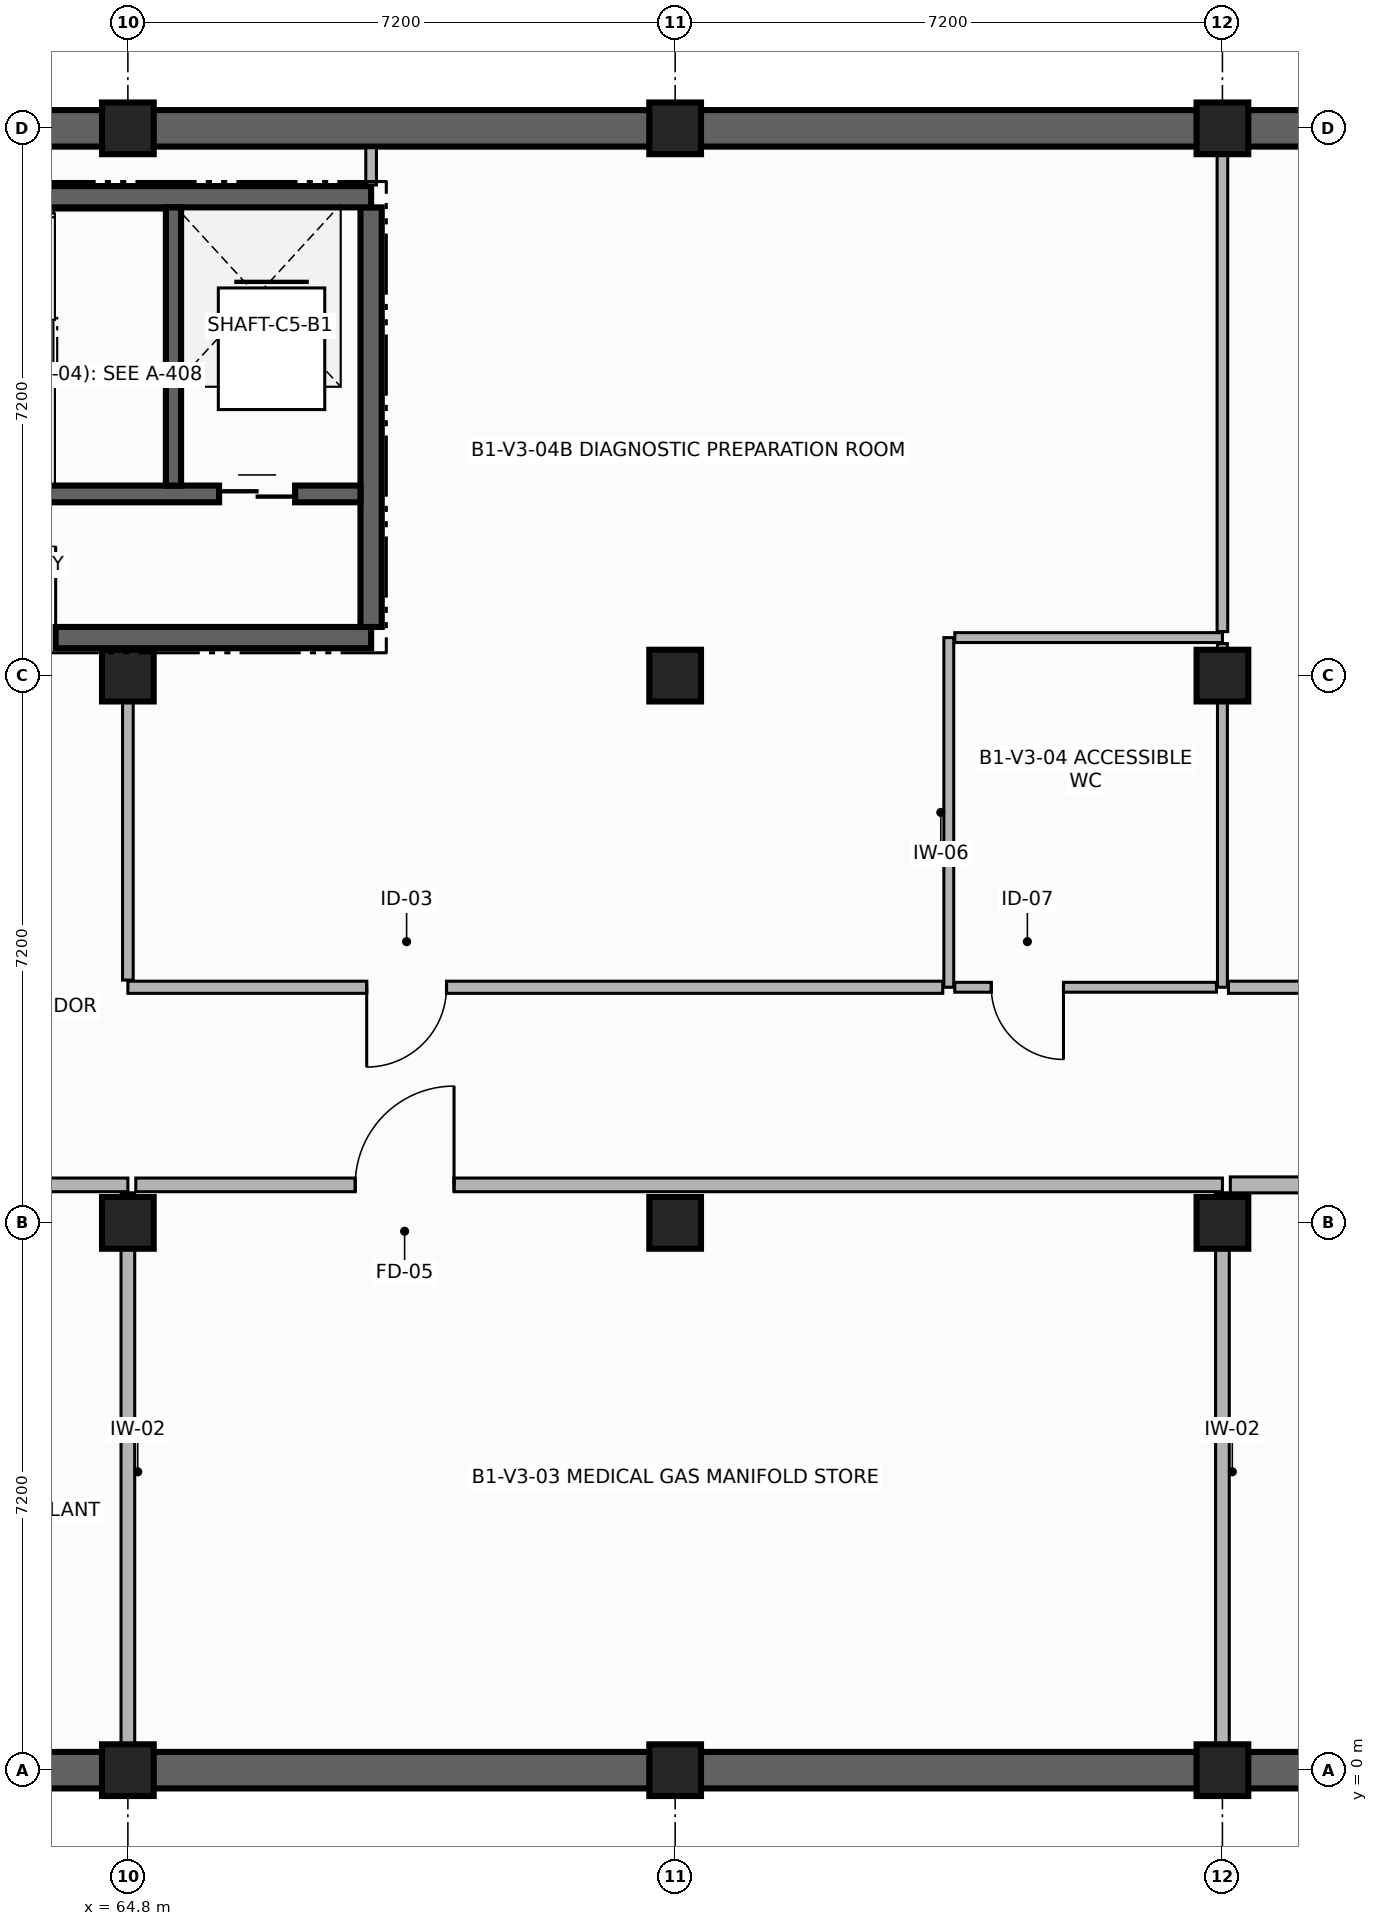
"""IFC4 building model, lengths in metres.
Left out: names, types, materials, properties, quantities, classifications, styles, units other than length and angle.
Written with IfcOpenShell. Run it as: python <this file> out.ifc"""

import sys

from ifc_helpers import new_model, si_unit, direction, frame, frame_2d, origin, origin_2d, place, context, subcontext, project, spatial, rectangle, extrude, element, fill, save


model = new_model("IFC4")
c1 = context("Model", 3, precision=1e-05, world=origin(), true_north=direction((0.0, 1.0)))
c2 = subcontext(c1, "Body", "Model", "MODEL_VIEW")
j1 = project(units=[si_unit("LENGTHUNIT", "METRE"), si_unit("PLANEANGLEUNIT", "RADIAN")], contexts=[c1])
p1 = place(None, origin())
s1 = spatial("IfcSite", under=j1, at=p1, CompositionType="ELEMENT")
p2 = place(p1, origin())
s2 = spatial("IfcBuilding", under=s1, at=p2, CompositionType="ELEMENT")
p3 = place(p2, frame((0.0, 0.0, -4.2)))
s3 = spatial("IfcBuildingStorey", under=s2, at=p3, CompositionType="ELEMENT", Elevation=-4.2)
for number, where, z_axis, x_axis in (
    (1, (64.8, 0.0, -0.4), (0.0, 0.0, 1.0), (1.0, 0.0, 0.0)),
    (2, (64.8, 7.2, -0.4), (0.0, 0.0, 1.0), (1.0, 0.0, 0.0)),
    (3, (64.8, 14.4, -0.4), (0.0, 0.0, 1.0), (1.0, 0.0, 0.0)),
    (4, (64.8, 21.6, -0.4), (0.0, 0.0, 1.0), (1.0, 0.0, 0.0)),
    (5, (72.0, 0.0, -0.4), (0.0, 0.0, 1.0), (1.0, 0.0, 0.0)),
    (6, (72.0, 7.2, -0.4), (0.0, 0.0, 1.0), (1.0, 0.0, 0.0)),
    (7, (72.0, 14.4, -0.4), (0.0, 0.0, 1.0), (1.0, 0.0, 0.0)),
    (8, (72.0, 21.6, -0.4), (0.0, 0.0, 1.0), (1.0, 0.0, 0.0)),
    (9, (79.2, 0.0, -0.4), (0.0, 0.0, 1.0), (1.0, 0.0, 0.0)),
    (10, (79.2, 7.2, -0.4), (0.0, 0.0, 1.0), (1.0, 0.0, 0.0)),
    (11, (79.2, 14.4, -0.4), (0.0, 0.0, 1.0), (1.0, 0.0, 0.0)),
    (12, (79.2, 21.6, -0.4), (0.0, 0.0, 1.0), (1.0, 0.0, 0.0)),
):
    element("IfcColumn", number, at=place(p3, frame(where, z_axis=z_axis, x_axis=x_axis)), inside=s3, PredefinedType="COLUMN", context=c2, shape_type="SweptSolid", body=[
        extrude(rectangle(XDim=0.68, YDim=0.68, at=origin_2d()), origin(), (0.0, 0.0, 1.0), 4.25),
    ])
for number, where, z_axis, x_axis in (
    (13, (57.6, 0.0, 0.0), (0.0, 0.0, 1.0), (1.0, 0.0, 0.0)),
    (14, (64.8, 0.0, 0.0), (0.0, 0.0, 1.0), (1.0, 0.0, 0.0)),
    (15, (72.0, 0.0, 0.0), (0.0, 0.0, 1.0), (1.0, 0.0, 0.0)),
    (16, (79.2, 0.0, 0.0), (0.0, 0.0, 1.0), (1.0, 0.0, 0.0)),
    (17, (86.4, 21.6, 0.0), (0.0, 0.0, 1.0), (-1.0, 0.0, 0.0)),
    (18, (79.2, 21.6, 0.0), (0.0, 0.0, 1.0), (-1.0, 0.0, 0.0)),
    (19, (72.0, 21.6, 0.0), (0.0, 0.0, 1.0), (-1.0, 0.0, 0.0)),
    (20, (64.8, 21.6, 0.0), (0.0, 0.0, 1.0), (-1.0, 0.0, 0.0)),
):
    element("IfcWall", number, at=place(p3, frame(where, z_axis=z_axis, x_axis=x_axis)), inside=s3, PredefinedType="ELEMENTEDWALL", context=c2, shape_type="SweptSolid", body=[
        extrude(rectangle(XDim=7.2, YDim=0.48, at=frame_2d((3.6, 0.0))), origin(), (0.0, 0.0, 1.0), 3.25),
    ])
p4 = place(p3, frame((58.5, 14.9, 0.0), z_axis=(0.0, 0.0, 1.0), x_axis=(1.0, 0.0, 0.0)))
e21 = element("IfcWall", 21, at=p4, inside=s3, PredefinedType="SHEAR", context=c2, shape_type="SweptSolid", body=[
    extrude(rectangle(XDim=9.5, YDim=0.28, at=frame_2d((4.75, 0.0))), origin(), (0.0, 0.0, 1.0), 3.9),
])
p5 = place(p4, frame((4.15, 0.0, 0.0)))
e22 = element("IfcOpeningElement", 22, at=p5, cuts=e21, PredefinedType="OPENING", context=c2, shape_type="SweptSolid", body=[
    extrude(rectangle(XDim=1.2, YDim=2.25, at=frame_2d((0.6, 1.125))), frame((0.0, 0.15, 0.0), z_axis=(0.0, -1.0, 0.0), x_axis=(1.0, 0.0, 0.0)), (0.0, 0.0, 1.0), 0.3),
])
p6 = place(p3, frame((68.0, 15.04, 0.0), z_axis=(0.0, 0.0, 1.0), x_axis=(0.0, 1.0, 0.0)))
e23 = element("IfcWall", 23, at=p6, inside=s3, PredefinedType="SHEAR", context=c2, shape_type="SweptSolid", body=[
    extrude(rectangle(XDim=5.52, YDim=0.28, at=frame_2d((2.76, 0.0))), origin(), (0.0, 0.0, 1.0), 3.9),
])
p7 = place(p3, frame((68.0, 20.7, 0.0), z_axis=(0.0, 0.0, 1.0), x_axis=(-1.0, 0.0, 0.0)))
e24 = element("IfcWall", 24, at=p7, inside=s3, PredefinedType="SHEAR", context=c2, shape_type="SweptSolid", body=[
    extrude(rectangle(XDim=9.5, YDim=0.28, at=frame_2d((4.75, 0.0))), origin(), (0.0, 0.0, 1.0), 3.9),
])
p8 = place(p3, frame((58.64, 16.79, 0.0), z_axis=(0.0, 0.0, 1.0), x_axis=(1.0, 0.0, 0.0)))
e25 = element("IfcWall", 25, at=p8, inside=s3, PredefinedType="SHEAR", context=c2, shape_type="SweptSolid", body=[
    extrude(rectangle(XDim=9.22, YDim=0.22, at=frame_2d((4.61, 0.0))), origin(), (0.0, 0.0, 1.0), 3.9),
])
p9 = place(p8, frame((0.31, 0.0, 0.0)))
e26 = element("IfcOpeningElement", 26, at=p9, cuts=e25, PredefinedType="OPENING", context=c2, shape_type="SweptSolid", body=[
    extrude(rectangle(XDim=1.1, YDim=2.15, at=frame_2d((0.55, 1.075))), frame((0.0, 0.12, 0.0), z_axis=(0.0, -1.0, 0.0), x_axis=(1.0, 0.0, 0.0)), (0.0, 0.0, 1.0), 0.24),
])
p10 = place(p8, frame((7.36, 0.0, 0.0)))
e27 = element("IfcOpeningElement", 27, at=p10, cuts=e25, PredefinedType="OPENING", context=c2, shape_type="SweptSolid", body=[
    extrude(rectangle(XDim=1.0, YDim=2.2, at=frame_2d((0.5, 1.1))), frame((0.0, 0.12, 0.0), z_axis=(0.0, -1.0, 0.0), x_axis=(1.0, 0.0, 0.0)), (0.0, 0.0, 1.0), 0.24),
])
p11 = place(p3, frame((65.4, 16.9, 0.0), z_axis=(0.0, 0.0, 1.0), x_axis=(0.0, 1.0, 0.0)))
e28 = element("IfcWall", 28, at=p11, inside=s3, PredefinedType="SHEAR", context=c2, shape_type="SweptSolid", body=[
    extrude(rectangle(XDim=3.66, YDim=0.2, at=frame_2d((1.83, 0.0))), origin(), (0.0, 0.0, 1.0), 3.9),
])
p12 = place(p3, frame((57.855, 7.7, 0.0), z_axis=(0.0, 0.0, 1.0), x_axis=(1.0, 0.0, 0.0)))
e29 = element("IfcWall", 29, at=p12, inside=s3, PredefinedType="PARTITIONING", context=c2, shape_type="SweptSolid", body=[
    extrude(rectangle(XDim=6.945, YDim=0.18, at=frame_2d((3.473, 0.0))), origin(), (0.0, 0.0, 1.0), 3.26),
])
p13 = place(p12, frame((2.588, 0.0, 0.0)))
e30 = element("IfcOpeningElement", 30, at=p13, cuts=e29, PredefinedType="OPENING", context=c2, shape_type="SweptSolid", body=[
    extrude(rectangle(XDim=1.3, YDim=2.2, at=frame_2d((0.65, 1.1))), frame((0.0, 0.1, 0.0), z_axis=(0.0, -1.0, 0.0), x_axis=(1.0, 0.0, 0.0)), (0.0, 0.0, 1.0), 0.2),
])
p14 = place(p3, frame((64.8, 7.596, 0.0), z_axis=(0.0, 0.0, 1.0), x_axis=(0.0, -1.0, 0.0)))
e31 = element("IfcWall", 31, at=p14, inside=s3, PredefinedType="PARTITIONING", context=c2, shape_type="SweptSolid", body=[
    extrude(rectangle(XDim=7.341, YDim=0.18, at=frame_2d((3.67, 0.0))), origin(), (0.0, 0.0, 1.0), 3.26),
])
p15 = place(p3, frame((64.904, 7.7, 0.0), z_axis=(0.0, 0.0, 1.0), x_axis=(1.0, 0.0, 0.0)))
e32 = element("IfcWall", 32, at=p15, inside=s3, PredefinedType="PARTITIONING", context=c2, shape_type="SweptSolid", body=[
    extrude(rectangle(XDim=14.296, YDim=0.18, at=frame_2d((7.148, 0.0))), origin(), (0.0, 0.0, 1.0), 3.26),
])
p16 = place(p15, frame((2.887, 0.0, 0.0)))
e33 = element("IfcOpeningElement", 33, at=p16, cuts=e32, PredefinedType="OPENING", context=c2, shape_type="SweptSolid", body=[
    extrude(rectangle(XDim=1.3, YDim=2.2, at=frame_2d((0.65, 1.1))), frame((0.0, 0.1, 0.0), z_axis=(0.0, -1.0, 0.0), x_axis=(1.0, 0.0, 0.0)), (0.0, 0.0, 1.0), 0.2),
])
p17 = place(p3, frame((79.2, 7.596, 0.0), z_axis=(0.0, 0.0, 1.0), x_axis=(0.0, -1.0, 0.0)))
e34 = element("IfcWall", 34, at=p17, inside=s3, PredefinedType="PARTITIONING", context=c2, shape_type="SweptSolid", body=[
    extrude(rectangle(XDim=7.341, YDim=0.18, at=frame_2d((3.67, 0.0))), origin(), (0.0, 0.0, 1.0), 3.26),
])
p18 = place(p3, frame((75.6, 10.3, 0.0), z_axis=(0.0, 0.0, 1.0), x_axis=(0.0, 1.0, 0.0)))
e35 = element("IfcWall", 35, at=p18, inside=s3, PredefinedType="PARTITIONING", context=c2, shape_type="SweptSolid", body=[
    extrude(rectangle(XDim=4.6, YDim=0.13, at=frame_2d((2.3, 0.0))), origin(), (0.0, 0.0, 1.0), 3.26),
])
p19 = place(p3, frame((75.679, 14.9, 0.0), z_axis=(0.0, 0.0, 1.0), x_axis=(1.0, 0.0, 0.0)))
e36 = element("IfcWall", 36, at=p19, inside=s3, PredefinedType="PARTITIONING", context=c2, shape_type="SweptSolid", body=[
    extrude(rectangle(XDim=3.521, YDim=0.13, at=frame_2d((1.76, 0.0))), origin(), (0.0, 0.0, 1.0), 3.26),
])
p20 = place(p3, frame((79.2, 14.821, 0.0), z_axis=(0.0, 0.0, 1.0), x_axis=(0.0, -1.0, 0.0)))
e37 = element("IfcWall", 37, at=p20, inside=s3, PredefinedType="PARTITIONING", context=c2, shape_type="SweptSolid", body=[
    extrude(rectangle(XDim=4.521, YDim=0.13, at=frame_2d((2.26, 0.0))), origin(), (0.0, 0.0, 1.0), 3.26),
])
p21 = place(p3, frame((79.121, 10.3, 0.0), z_axis=(0.0, 0.0, 1.0), x_axis=(-1.0, 0.0, 0.0)))
e38 = element("IfcWall", 38, at=p21, inside=s3, PredefinedType="PARTITIONING", context=c2, shape_type="SweptSolid", body=[
    extrude(rectangle(XDim=3.442, YDim=0.13, at=frame_2d((1.721, 0.0))), origin(), (0.0, 0.0, 1.0), 3.26),
])
p22 = place(p21, frame((2.012, 0.0, 0.0)))
e39 = element("IfcOpeningElement", 39, at=p22, cuts=e38, PredefinedType="OPENING", context=c2, shape_type="SweptSolid", body=[
    extrude(rectangle(XDim=0.95, YDim=2.1, at=frame_2d((0.475, 1.05))), frame((0.0, 0.075, 0.0), z_axis=(0.0, -1.0, 0.0), x_axis=(1.0, 0.0, 0.0)), (0.0, 0.0, 1.0), 0.15),
])
p23 = place(p3, frame((75.521, 10.3, 0.0), z_axis=(0.0, 0.0, 1.0), x_axis=(-1.0, 0.0, 0.0)))
e40 = element("IfcWall", 40, at=p23, inside=s3, PredefinedType="PARTITIONING", context=c2, shape_type="SweptSolid", body=[
    extrude(rectangle(XDim=10.721, YDim=0.16, at=frame_2d((5.36, 0.0))), origin(), (0.0, 0.0, 1.0), 3.26),
])
p24 = place(p23, frame((6.529, 0.0, 0.0)))
e41 = element("IfcOpeningElement", 41, at=p24, cuts=e40, PredefinedType="OPENING", context=c2, shape_type="SweptSolid", body=[
    extrude(rectangle(XDim=1.05, YDim=2.15, at=frame_2d((0.525, 1.075))), frame((0.0, 0.09, 0.0), z_axis=(0.0, -1.0, 0.0), x_axis=(1.0, 0.0, 0.0)), (0.0, 0.0, 1.0), 0.18),
])
p25 = place(p3, frame((64.8, 10.394, 0.0), z_axis=(0.0, 0.0, 1.0), x_axis=(0.0, 1.0, 0.0)))
e42 = element("IfcWall", 42, at=p25, inside=s3, PredefinedType="PARTITIONING", context=c2, shape_type="SweptSolid", body=[
    extrude(rectangle(XDim=4.351, YDim=0.14, at=frame_2d((2.176, 0.0))), origin(), (0.0, 0.0, 1.0), 3.26),
])
p26 = place(p3, frame((68.0, 20.855, 0.0), z_axis=(0.0, 0.0, 1.0), x_axis=(0.0, 1.0, 0.0)))
e43 = element("IfcWall", 43, at=p26, inside=s3, PredefinedType="PARTITIONING", context=c2, shape_type="SweptSolid", body=[
    extrude(rectangle(XDim=0.49, YDim=0.14, at=frame_2d((0.245, 0.0))), origin(), (0.0, 0.0, 1.0), 3.26),
])
p27 = place(p3, frame((79.2, 21.345, 0.0), z_axis=(0.0, 0.0, 1.0), x_axis=(0.0, -1.0, 0.0)))
e44 = element("IfcWall", 44, at=p27, inside=s3, PredefinedType="PARTITIONING", context=c2, shape_type="SweptSolid", body=[
    extrude(rectangle(XDim=6.366, YDim=0.14, at=frame_2d((3.183, 0.0))), origin(), (0.0, 0.0, 1.0), 3.26),
])
p28 = place(p3, frame((79.304, 7.7, 0.0), z_axis=(0.0, 0.0, 1.0), x_axis=(1.0, 0.0, 0.0)))
e45 = element("IfcWall", 45, at=p28, inside=s3, PredefinedType="PARTITIONING", context=c2, shape_type="SweptSolid", body=[
    extrude(rectangle(XDim=7.096, YDim=0.21, at=frame_2d((3.548, 0.0))), origin(), (0.0, 0.0, 1.0), 3.26),
])
p29 = place(p28, frame((3.073, 0.0, 0.0)))
e46 = element("IfcOpeningElement", 46, at=p29, cuts=e45, PredefinedType="OPENING", context=c2, shape_type="SweptSolid", body=[
    extrude(rectangle(XDim=0.95, YDim=2.15, at=frame_2d((0.475, 1.075))), frame((0.0, 0.115, 0.0), z_axis=(0.0, -1.0, 0.0), x_axis=(1.0, 0.0, 0.0)), (0.0, 0.0, 1.0), 0.23),
])
p30 = place(p3, frame((86.4, 10.3, 0.0), z_axis=(0.0, 0.0, 1.0), x_axis=(-1.0, 0.0, 0.0)))
e47 = element("IfcWall", 47, at=p30, inside=s3, PredefinedType="PARTITIONING", context=c2, shape_type="SweptSolid", body=[
    extrude(rectangle(XDim=7.121, YDim=0.16, at=frame_2d((3.561, 0.0))), origin(), (0.0, 0.0, 1.0), 3.26),
])
p31 = place(p30, frame((3.071, 0.0, 0.0)))
e48 = element("IfcOpeningElement", 48, at=p31, cuts=e47, PredefinedType="OPENING", context=c2, shape_type="SweptSolid", body=[
    extrude(rectangle(XDim=0.98, YDim=2.15, at=frame_2d((0.49, 1.075))), frame((0.0, 0.09, 0.0), z_axis=(0.0, -1.0, 0.0), x_axis=(1.0, 0.0, 0.0)), (0.0, 0.0, 1.0), 0.18),
])
p32 = place(p10, origin())
e49 = element("IfcDoor", 49, at=p32, inside=s3, OperationType="DOUBLE_DOOR_SLIDING", PredefinedType="DOOR", context=c2, shape_type="SweptSolid", body=[
    extrude(rectangle(XDim=1.0, YDim=2.2, at=frame_2d((0.5, 1.1))), frame((0.0, 0.025, 0.0), z_axis=(0.0, -1.0, 0.0), x_axis=(1.0, 0.0, 0.0)), (0.0, 0.0, 1.0), 0.05),
])
fill(e27, e49)
p33 = place(p5, origin())
e50 = element("IfcDoor", 50, at=p33, inside=s3, OperationType="SINGLE_SWING_RIGHT", PredefinedType="DOOR", context=c2, shape_type="SweptSolid", body=[
    extrude(rectangle(XDim=1.2, YDim=2.25, at=frame_2d((0.6, 1.125))), frame((0.0, 0.025, 0.0), z_axis=(0.0, -1.0, 0.0), x_axis=(1.0, 0.0, 0.0)), (0.0, 0.0, 1.0), 0.05),
])
fill(e22, e50)
p34 = place(p16, origin())
e51 = element("IfcDoor", 51, at=p34, inside=s3, OperationType="SINGLE_SWING_RIGHT", PredefinedType="DOOR", context=c2, shape_type="SweptSolid", body=[
    extrude(rectangle(XDim=1.3, YDim=2.2, at=frame_2d((0.65, 1.1))), frame((0.0, 0.025, 0.0), z_axis=(0.0, -1.0, 0.0), x_axis=(1.0, 0.0, 0.0)), (0.0, 0.0, 1.0), 0.05),
])
fill(e33, e51)
p35 = place(p22, origin())
e52 = element("IfcDoor", 52, at=p35, inside=s3, OperationType="SINGLE_SWING_LEFT", PredefinedType="DOOR", context=c2, shape_type="SweptSolid", body=[
    extrude(rectangle(XDim=0.95, YDim=2.1, at=frame_2d((0.475, 1.05))), frame((0.0, 0.025, 0.0), z_axis=(0.0, -1.0, 0.0), x_axis=(1.0, 0.0, 0.0)), (0.0, 0.0, 1.0), 0.05),
])
fill(e39, e52)
p36 = place(p24, origin())
e53 = element("IfcDoor", 53, at=p36, inside=s3, OperationType="SINGLE_SWING_RIGHT", PredefinedType="DOOR", context=c2, shape_type="SweptSolid", body=[
    extrude(rectangle(XDim=1.05, YDim=2.15, at=frame_2d((0.525, 1.075))), frame((0.0, 0.025, 0.0), z_axis=(0.0, -1.0, 0.0), x_axis=(1.0, 0.0, 0.0)), (0.0, 0.0, 1.0), 0.05),
])
fill(e41, e53)
save(model, sys.argv[1])
